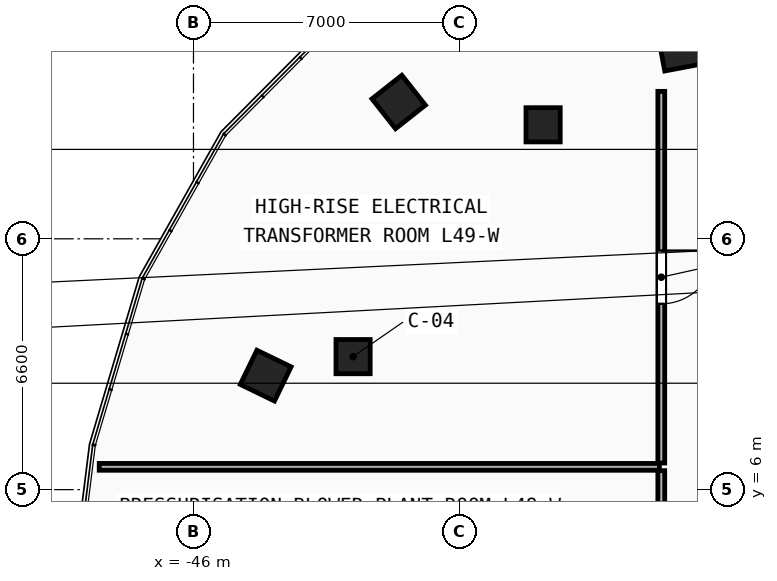
"""IFC4 building model, lengths in metres.
Left out: names, types, materials, properties, quantities, classifications, styles, units other than length and angle.
Written with IfcOpenShell. Run it as: python <this file> out.ifc"""

import sys

from ifc_helpers import new_model, si_unit, direction, frame, frame_2d, origin, origin_2d, place, context, subcontext, project, spatial, rectangle, extrude, element, fill, save


model = new_model("IFC4")
c1 = context("Model", 3, precision=1e-05, world=origin(), true_north=direction((0.0, 1.0)))
c2 = subcontext(c1, "Body", "Model", "MODEL_VIEW")
j1 = project(units=[si_unit("LENGTHUNIT", "METRE"), si_unit("PLANEANGLEUNIT", "RADIAN")], contexts=[c1])
p1 = place(None, origin())
s1 = spatial("IfcSite", under=j1, at=p1, CompositionType="ELEMENT")
p2 = place(p1, origin())
s2 = spatial("IfcBuilding", under=s1, at=p2, CompositionType="ELEMENT")
p3 = place(p2, frame((0.0, 0.0, 187.2)))
s3 = spatial("IfcBuildingStorey", under=s2, at=p3, CompositionType="ELEMENT", Elevation=187.2)
for number, where, z_axis, x_axis in (
    (1, (-41.8, 9.5, 0.0), (0.0, 0.0, 1.0), (1.0, 0.0, 0.0)),
    (2, (-36.8, 15.6, 0.0), (0.0, 0.0, 1.0), (1.0, 0.0, 0.0)),
):
    element("IfcColumn", number, at=place(p3, frame(where, z_axis=z_axis, x_axis=x_axis)), inside=s3, PredefinedType="COLUMN", context=c2, shape_type="SweptSolid", body=[
        extrude(rectangle(XDim=0.9, YDim=0.9, at=origin_2d()), origin(), (0.0, 0.0, 1.0), 4.6),
    ])
for number, where, z_axis, x_axis in (
    (3, (-33.2, 17.6, 0.0), (0.0, 0.0, 1.0), (-0.983, -0.186, 0.0)),
    (4, (-40.6, 16.2, 0.0), (0.0, 0.0, 1.0), (-0.785, -0.619, 0.0)),
    (5, (-44.1, 9.0, 0.0), (0.0, 0.0, 1.0), (-0.437, -0.899, 0.0)),
):
    element("IfcColumn", number, at=place(p3, frame(where, z_axis=z_axis, x_axis=x_axis)), inside=s3, PredefinedType="COLUMN", context=c2, shape_type="SweptSolid", body=[
        extrude(rectangle(XDim=1.0, YDim=1.0, at=origin_2d()), origin(), (0.0, 0.0, 1.0), 4.6),
    ])
p4 = place(p3, frame((-48.48, 6.6, 0.0), z_axis=(0.0, 0.0, 1.0), x_axis=(1.0, 0.0, 0.0)))
e6 = element("IfcWall", 6, at=p4, inside=s3, PredefinedType="PARTITIONING", context=c2, shape_type="SweptSolid", body=[
    extrude(rectangle(XDim=14.74, YDim=0.18, at=frame_2d((7.37, 0.0))), origin(), (0.0, 0.0, 1.0), 4.34),
])
p5 = place(p3, frame((-33.69, 6.5, 0.0), z_axis=(0.0, 0.0, 1.0), x_axis=(0.0, -1.0, 0.0)))
e7 = element("IfcWall", 7, at=p5, inside=s3, PredefinedType="PARTITIONING", context=c2, shape_type="SweptSolid", body=[
    extrude(rectangle(XDim=4.32, YDim=0.18, at=frame_2d((2.16, 0.0))), origin(), (0.0, 0.0, 1.0), 4.34),
])
p6 = place(p3, frame((-33.69, 16.48, 0.0), z_axis=(0.0, 0.0, 1.0), x_axis=(0.0, -1.0, 0.0)))
e8 = element("IfcWall", 8, at=p6, inside=s3, PredefinedType="PARTITIONING", context=c2, shape_type="SweptSolid", body=[
    extrude(rectangle(XDim=9.78, YDim=0.18, at=frame_2d((4.89, 0.0))), origin(), (0.0, 0.0, 1.0), 4.34),
])
p7 = place(p6, frame((4.19, 0.0, 0.0)))
e9 = element("IfcOpeningElement", 9, at=p7, cuts=e8, PredefinedType="OPENING", context=c2, shape_type="SweptSolid", body=[
    extrude(rectangle(XDim=1.4, YDim=2.2, at=frame_2d((0.7, 1.1))), frame((0.0, 0.1, 0.0), z_axis=(0.0, -1.0, 0.0), x_axis=(1.0, 0.0, 0.0)), (0.0, 0.0, 1.0), 0.2),
])
p8 = place(p7, origin())
e10 = element("IfcDoor", 10, at=p8, inside=s3, OperationType="SINGLE_SWING_LEFT", PredefinedType="DOOR", context=c2, shape_type="SweptSolid", body=[
    extrude(rectangle(XDim=1.4, YDim=2.2, at=frame_2d((0.7, 1.1))), frame((0.0, 0.025, 0.0), z_axis=(0.0, -1.0, 0.0), x_axis=(1.0, 0.0, 0.0)), (0.0, 0.0, 1.0), 0.05),
])
fill(e9, e10)
save(model, sys.argv[1])
